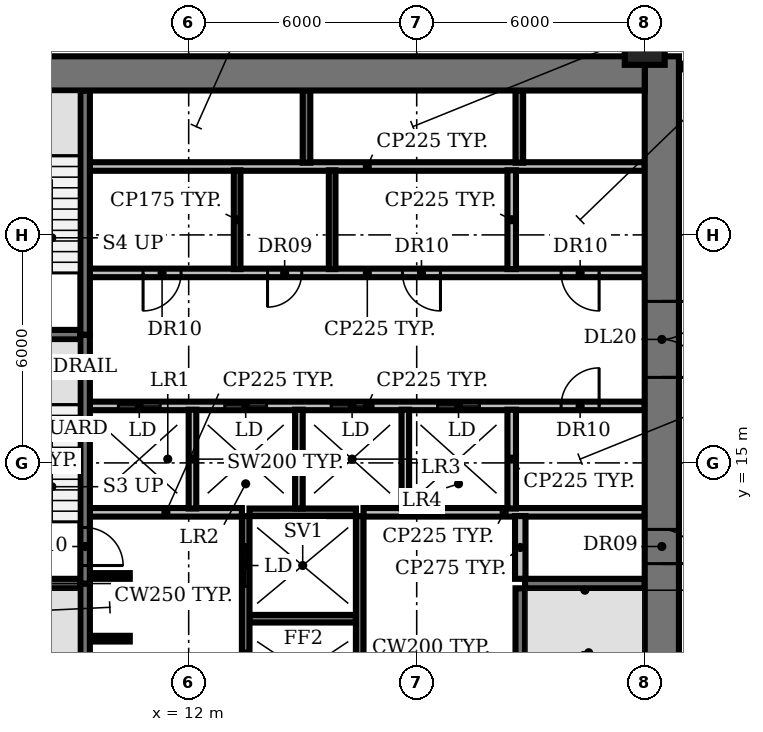
"""IFC4 building model, lengths in metres.
Left out: names, types, materials, properties, quantities, classifications, styles, units other than length and angle.
Written with IfcOpenShell. Run it as: python <this file> out.ifc"""

import sys

from ifc_helpers import new_model, si_unit, direction, frame, frame_2d, origin, origin_2d, place, context, subcontext, project, spatial, rectangle, circle, extrude, element, fill, save


model = new_model("IFC4")
c1 = context("Model", 3, precision=1e-05, world=origin(), true_north=direction((0.0, 1.0)))
c2 = subcontext(c1, "Body", "Model", "MODEL_VIEW")
j1 = project(units=[si_unit("LENGTHUNIT", "METRE"), si_unit("PLANEANGLEUNIT", "RADIAN")], contexts=[c1])
p1 = place(None, origin())
s1 = spatial("IfcSite", under=j1, at=p1, CompositionType="ELEMENT")
p2 = place(p1, origin())
s2 = spatial("IfcBuilding", under=s1, at=p2, CompositionType="ELEMENT")
p3 = place(p2, frame((0.0, 0.0, 45.8)))
s3 = spatial("IfcBuildingStorey", under=s2, at=p3, CompositionType="ELEMENT", Elevation=45.8)
p4 = place(p3, frame((24.0, 26.0, 0.0), z_axis=(0.0, 0.0, 1.0), x_axis=(1.0, 0.0, 0.0)))
e1 = element("IfcColumn", 1, at=p4, inside=s3, PredefinedType="COLUMN", context=c2, shape_type="SweptSolid", body=[
    extrude(circle(Radius=0.525, at=origin_2d()), origin(), (0.0, 0.0, 1.0), 3.85),
])
p5 = place(p3, frame((9.4, 10.375, 0.0), z_axis=(0.0, 0.0, 1.0), x_axis=(1.0, 0.0, 0.0)))
e2 = element("IfcWall", 2, at=p5, inside=s3, PredefinedType="SHEAR", context=c2, shape_type="SweptSolid", body=[
    extrude(rectangle(XDim=1.05, YDim=0.15, at=frame_2d((0.525, 0.0))), origin(), (0.0, 0.0, 1.0), 3.85),
])
p6 = place(p3, frame((13.6, 10.9, 0.0), z_axis=(0.0, 0.0, 1.0), x_axis=(1.0, 0.0, 0.0)))
e3 = element("IfcWall", 3, at=p6, inside=s3, PredefinedType="SHEAR", context=c2, shape_type="SweptSolid", body=[
    extrude(rectangle(XDim=2.8, YDim=0.2, at=frame_2d((1.4, 0.0))), origin(), (0.0, 0.0, 1.0), 3.85),
])
for number, where, z_axis, x_axis in (
    (4, (6.0, 11.825, 0.0), (0.0, 0.0, 1.0), (1.0, 0.0, 0.0)),
    (5, (20.85, 11.825, 0.0), (0.0, 0.0, 1.0), (1.0, 0.0, 0.0)),
):
    element("IfcWall", number, at=place(p3, frame(where, z_axis=z_axis, x_axis=x_axis)), inside=s3, PredefinedType="SHEAR", context=c2, shape_type="SweptSolid", body=[
        extrude(rectangle(XDim=3.15, YDim=0.25, at=frame_2d((1.575, 0.0))), origin(), (0.0, 0.0, 1.0), 3.85),
    ])
p7 = place(p3, frame((9.4, 12.025, 0.0), z_axis=(0.0, 0.0, 1.0), x_axis=(1.0, 0.0, 0.0)))
e6 = element("IfcWall", 6, at=p7, inside=s3, PredefinedType="SHEAR", context=c2, shape_type="SweptSolid", body=[
    extrude(rectangle(XDim=1.05, YDim=0.15, at=frame_2d((0.525, 0.0))), origin(), (0.0, 0.0, 1.0), 3.85),
])
p8 = place(p3, frame((9.4, 13.7, 0.0), z_axis=(0.0, 0.0, 1.0), x_axis=(1.0, 0.0, 0.0)))
e7 = element("IfcWall", 7, at=p8, inside=s3, PredefinedType="PARTITIONING", context=c2, shape_type="SweptSolid", body=[
    extrude(rectangle(XDim=4.0, YDim=0.225, at=frame_2d((2.0, 0.0))), origin(), (0.0, 0.0, 1.0), 3.85),
])
p9 = place(p3, frame((13.6, 13.7, 0.0), z_axis=(0.0, 0.0, 1.0), x_axis=(1.0, 0.0, 0.0)))
e8 = element("IfcWall", 8, at=p9, inside=s3, PredefinedType="SHEAR", context=c2, shape_type="SweptSolid", body=[
    extrude(rectangle(XDim=2.8, YDim=0.2, at=frame_2d((1.4, 0.0))), origin(), (0.0, 0.0, 1.0), 3.85),
])
p10 = place(p3, frame((16.6, 13.7, 0.0), z_axis=(0.0, 0.0, 1.0), x_axis=(1.0, 0.0, 0.0)))
e9 = element("IfcWall", 9, at=p10, inside=s3, PredefinedType="PARTITIONING", context=c2, shape_type="SweptSolid", body=[
    extrude(rectangle(XDim=7.4, YDim=0.225, at=frame_2d((3.7, 0.0))), origin(), (0.0, 0.0, 1.0), 3.85),
])
p11 = place(p3, frame((9.4, 16.5, 0.0), z_axis=(0.0, 0.0, 1.0), x_axis=(1.0, 0.0, 0.0)))
e10 = element("IfcWall", 10, at=p11, inside=s3, PredefinedType="PARTITIONING", context=c2, shape_type="SweptSolid", body=[
    extrude(rectangle(XDim=14.6, YDim=0.225, at=frame_2d((7.3, 0.0))), origin(), (0.0, 0.0, 1.0), 3.85),
])
p12 = place(p11, frame((0.75, 0.0, 0.0)))
e11 = element("IfcOpeningElement", 11, at=p12, cuts=e10, PredefinedType="OPENING", context=c2, shape_type="SweptSolid", body=[
    extrude(rectangle(XDim=1.1, YDim=2.1, at=frame_2d((0.55, 1.05))), frame((0.0, 0.123, 0.0), z_axis=(0.0, -1.0, 0.0), x_axis=(1.0, 0.0, 0.0)), (0.0, 0.0, 1.0), 0.245),
])
p13 = place(p11, frame((3.55, 0.0, 0.0)))
e12 = element("IfcOpeningElement", 12, at=p13, cuts=e10, PredefinedType="OPENING", context=c2, shape_type="SweptSolid", body=[
    extrude(rectangle(XDim=1.1, YDim=2.1, at=frame_2d((0.55, 1.05))), frame((0.0, 0.123, 0.0), z_axis=(0.0, -1.0, 0.0), x_axis=(1.0, 0.0, 0.0)), (0.0, 0.0, 1.0), 0.245),
])
p14 = place(p11, frame((6.35, 0.0, 0.0)))
e13 = element("IfcOpeningElement", 13, at=p14, cuts=e10, PredefinedType="OPENING", context=c2, shape_type="SweptSolid", body=[
    extrude(rectangle(XDim=1.1, YDim=2.1, at=frame_2d((0.55, 1.05))), frame((0.0, 0.123, 0.0), z_axis=(0.0, -1.0, 0.0), x_axis=(1.0, 0.0, 0.0)), (0.0, 0.0, 1.0), 0.245),
])
p15 = place(p11, frame((9.15, 0.0, 0.0)))
e14 = element("IfcOpeningElement", 14, at=p15, cuts=e10, PredefinedType="OPENING", context=c2, shape_type="SweptSolid", body=[
    extrude(rectangle(XDim=1.1, YDim=2.1, at=frame_2d((0.55, 1.05))), frame((0.0, 0.123, 0.0), z_axis=(0.0, -1.0, 0.0), x_axis=(1.0, 0.0, 0.0)), (0.0, 0.0, 1.0), 0.245),
])
p16 = place(p11, frame((12.4, 0.0, 0.0)))
e15 = element("IfcOpeningElement", 15, at=p16, cuts=e10, PredefinedType="OPENING", context=c2, shape_type="SweptSolid", body=[
    extrude(rectangle(XDim=1.0, YDim=2.1, at=frame_2d((0.5, 1.05))), frame((0.0, 0.123, 0.0), z_axis=(0.0, -1.0, 0.0), x_axis=(1.0, 0.0, 0.0)), (0.0, 0.0, 1.0), 0.245),
])
p17 = place(p3, frame((6.0, 18.375, 0.0), z_axis=(0.0, 0.0, 1.0), x_axis=(1.0, 0.0, 0.0)))
e16 = element("IfcWall", 16, at=p17, inside=s3, PredefinedType="SHEAR", context=c2, shape_type="SweptSolid", body=[
    extrude(rectangle(XDim=3.15, YDim=0.25, at=frame_2d((1.575, 0.0))), origin(), (0.0, 0.0, 1.0), 3.85),
])
p18 = place(p3, frame((24.0, 20.0, 0.0), z_axis=(0.0, 0.0, 1.0), x_axis=(-1.0, 0.0, 0.0)))
e17 = element("IfcWall", 17, at=p18, inside=s3, PredefinedType="PARTITIONING", context=c2, shape_type="SweptSolid", body=[
    extrude(rectangle(XDim=14.6, YDim=0.225, at=frame_2d((7.3, 0.0))), origin(), (0.0, 0.0, 1.0), 3.85),
])
p19 = place(p18, frame((12.2, 0.0, 0.0)))
e18 = element("IfcOpeningElement", 18, at=p19, cuts=e17, PredefinedType="OPENING", context=c2, shape_type="SweptSolid", body=[
    extrude(rectangle(XDim=1.0, YDim=2.1, at=frame_2d((0.5, 1.05))), frame((0.0, 0.123, 0.0), z_axis=(0.0, -1.0, 0.0), x_axis=(1.0, 0.0, 0.0)), (0.0, 0.0, 1.0), 0.245),
])
p20 = place(p18, frame((9.025, 0.0, 0.0)))
e19 = element("IfcOpeningElement", 19, at=p20, cuts=e17, PredefinedType="OPENING", context=c2, shape_type="SweptSolid", body=[
    extrude(rectangle(XDim=0.9, YDim=2.1, at=frame_2d((0.45, 1.05))), frame((0.0, 0.123, 0.0), z_axis=(0.0, -1.0, 0.0), x_axis=(1.0, 0.0, 0.0)), (0.0, 0.0, 1.0), 0.245),
])
p21 = place(p18, frame((5.375, 0.0, 0.0)))
e20 = element("IfcOpeningElement", 20, at=p21, cuts=e17, PredefinedType="OPENING", context=c2, shape_type="SweptSolid", body=[
    extrude(rectangle(XDim=1.0, YDim=2.1, at=frame_2d((0.5, 1.05))), frame((0.0, 0.123, 0.0), z_axis=(0.0, -1.0, 0.0), x_axis=(1.0, 0.0, 0.0)), (0.0, 0.0, 1.0), 0.245),
])
p22 = place(p18, frame((1.2, 0.0, 0.0)))
e21 = element("IfcOpeningElement", 21, at=p22, cuts=e17, PredefinedType="OPENING", context=c2, shape_type="SweptSolid", body=[
    extrude(rectangle(XDim=1.0, YDim=2.1, at=frame_2d((0.5, 1.05))), frame((0.0, 0.123, 0.0), z_axis=(0.0, -1.0, 0.0), x_axis=(1.0, 0.0, 0.0)), (0.0, 0.0, 1.0), 0.245),
])
p23 = place(p3, frame((9.4, 22.8, 0.0), z_axis=(0.0, 0.0, 1.0), x_axis=(1.0, 0.0, 0.0)))
e22 = element("IfcWall", 22, at=p23, inside=s3, PredefinedType="PARTITIONING", context=c2, shape_type="SweptSolid", body=[
    extrude(rectangle(XDim=14.6, YDim=0.225, at=frame_2d((7.3, 0.0))), origin(), (0.0, 0.0, 1.0), 3.85),
])
p24 = place(p3, frame((9.275, 11.825, 0.0), z_axis=(0.0, 0.0, 1.0), x_axis=(0.0, -1.0, 0.0)))
e23 = element("IfcWall", 23, at=p24, inside=s3, PredefinedType="SHEAR", context=c2, shape_type="SweptSolid", body=[
    extrude(rectangle(XDim=6.425, YDim=0.25, at=frame_2d((3.212, 0.0))), origin(), (0.0, 0.0, 1.0), 3.85),
])
p25 = place(p24, frame((5.075, 0.0, 0.0)))
e24 = element("IfcOpeningElement", 24, at=p25, cuts=e23, PredefinedType="OPENING", context=c2, shape_type="SweptSolid", body=[
    extrude(rectangle(XDim=1.0, YDim=2.1, at=frame_2d((0.5, 1.05))), frame((0.0, 0.135, 0.0), z_axis=(0.0, -1.0, 0.0), x_axis=(1.0, 0.0, 0.0)), (0.0, 0.0, 1.0), 0.27),
])
p26 = place(p3, frame((9.275, 18.375, 0.0), z_axis=(0.0, 0.0, 1.0), x_axis=(0.0, -1.0, 0.0)))
e25 = element("IfcWall", 25, at=p26, inside=s3, PredefinedType="SHEAR", context=c2, shape_type="SweptSolid", body=[
    extrude(rectangle(XDim=6.55, YDim=0.25, at=frame_2d((3.275, 0.0))), origin(), (0.0, 0.0, 1.0), 3.85),
])
p27 = place(p26, frame((5.075, 0.0, 0.0)))
e26 = element("IfcOpeningElement", 26, at=p27, cuts=e25, PredefinedType="OPENING", context=c2, shape_type="SweptSolid", body=[
    extrude(rectangle(XDim=1.0, YDim=2.1, at=frame_2d((0.5, 1.05))), frame((0.0, 0.135, 0.0), z_axis=(0.0, -1.0, 0.0), x_axis=(1.0, 0.0, 0.0)), (0.0, 0.0, 1.0), 0.27),
])
p28 = place(p3, frame((9.275, 18.375, 0.0), z_axis=(0.0, 0.0, 1.0), x_axis=(0.0, 1.0, 0.0)))
e27 = element("IfcWall", 27, at=p28, inside=s3, PredefinedType="SHEAR", context=c2, shape_type="SweptSolid", body=[
    extrude(rectangle(XDim=6.425, YDim=0.25, at=frame_2d((3.212, 0.0))), origin(), (0.0, 0.0, 1.0), 3.85),
])
p29 = place(p3, frame((12.1, 13.8, 0.0), z_axis=(0.0, 0.0, 1.0), x_axis=(0.0, 1.0, 0.0)))
e28 = element("IfcWall", 28, at=p29, inside=s3, PredefinedType="SOLIDWALL", context=c2, shape_type="SweptSolid", body=[
    extrude(rectangle(XDim=2.6, YDim=0.2, at=frame_2d((1.3, 0.0))), origin(), (0.0, 0.0, 1.0), 3.85),
])
p30 = place(p3, frame((13.275, 20.1, 0.0), z_axis=(0.0, 0.0, 1.0), x_axis=(0.0, 1.0, 0.0)))
e29 = element("IfcWall", 29, at=p30, inside=s3, PredefinedType="PARTITIONING", context=c2, shape_type="SweptSolid", body=[
    extrude(rectangle(XDim=2.6, YDim=0.175, at=frame_2d((1.3, 0.0))), origin(), (0.0, 0.0, 1.0), 3.85),
])
p31 = place(p3, frame((13.5, 5.4, 0.0), z_axis=(0.0, 0.0, 1.0), x_axis=(0.0, 1.0, 0.0)))
e30 = element("IfcWall", 30, at=p31, inside=s3, PredefinedType="SHEAR", context=c2, shape_type="SweptSolid", body=[
    extrude(rectangle(XDim=8.2, YDim=0.2, at=frame_2d((4.1, 0.0))), origin(), (0.0, 0.0, 1.0), 3.85),
])
p32 = place(p31, frame((0.75, 0.0, 0.0)))
e31 = element("IfcOpeningElement", 31, at=p32, cuts=e30, PredefinedType="OPENING", context=c2, shape_type="SweptSolid", body=[
    extrude(rectangle(XDim=1.1, YDim=2.1, at=frame_2d((0.55, 1.05))), frame((0.0, 0.11, 0.0), z_axis=(0.0, -1.0, 0.0), x_axis=(1.0, 0.0, 0.0)), (0.0, 0.0, 1.0), 0.22),
])
p33 = place(p31, frame((3.55, 0.0, 0.0)))
e32 = element("IfcOpeningElement", 32, at=p33, cuts=e30, PredefinedType="OPENING", context=c2, shape_type="SweptSolid", body=[
    extrude(rectangle(XDim=1.1, YDim=2.1, at=frame_2d((0.55, 1.05))), frame((0.0, 0.11, 0.0), z_axis=(0.0, -1.0, 0.0), x_axis=(1.0, 0.0, 0.0)), (0.0, 0.0, 1.0), 0.22),
])
p34 = place(p31, frame((6.35, 0.0, 0.0)))
e33 = element("IfcOpeningElement", 33, at=p34, cuts=e30, PredefinedType="OPENING", context=c2, shape_type="SweptSolid", body=[
    extrude(rectangle(XDim=1.1, YDim=2.1, at=frame_2d((0.55, 1.05))), frame((0.0, 0.11, 0.0), z_axis=(0.0, -1.0, 0.0), x_axis=(1.0, 0.0, 0.0)), (0.0, 0.0, 1.0), 0.22),
])
p35 = place(p3, frame((14.9, 13.8, 0.0), z_axis=(0.0, 0.0, 1.0), x_axis=(0.0, 1.0, 0.0)))
e34 = element("IfcWall", 34, at=p35, inside=s3, PredefinedType="SOLIDWALL", context=c2, shape_type="SweptSolid", body=[
    extrude(rectangle(XDim=2.6, YDim=0.2, at=frame_2d((1.3, 0.0))), origin(), (0.0, 0.0, 1.0), 3.85),
])
p36 = place(p3, frame((15.1, 22.9, 0.0), z_axis=(0.0, 0.0, 1.0), x_axis=(0.0, 1.0, 0.0)))
e35 = element("IfcWall", 35, at=p36, inside=s3, PredefinedType="SHEAR", context=c2, shape_type="SweptSolid", body=[
    extrude(rectangle(XDim=1.9, YDim=0.2, at=frame_2d((0.95, 0.0))), origin(), (0.0, 0.0, 1.0), 3.85),
])
p37 = place(p3, frame((15.775, 20.1, 0.0), z_axis=(0.0, 0.0, 1.0), x_axis=(0.0, 1.0, 0.0)))
e36 = element("IfcWall", 36, at=p37, inside=s3, PredefinedType="PARTITIONING", context=c2, shape_type="SweptSolid", body=[
    extrude(rectangle(XDim=2.6, YDim=0.175, at=frame_2d((1.3, 0.0))), origin(), (0.0, 0.0, 1.0), 3.85),
])
p38 = place(p3, frame((16.5, 5.4, 0.0), z_axis=(0.0, 0.0, 1.0), x_axis=(0.0, 1.0, 0.0)))
e37 = element("IfcWall", 37, at=p38, inside=s3, PredefinedType="SHEAR", context=c2, shape_type="SweptSolid", body=[
    extrude(rectangle(XDim=8.2, YDim=0.2, at=frame_2d((4.1, 0.0))), origin(), (0.0, 0.0, 1.0), 3.85),
])
p39 = place(p3, frame((17.7, 13.8, 0.0), z_axis=(0.0, 0.0, 1.0), x_axis=(0.0, 1.0, 0.0)))
e38 = element("IfcWall", 38, at=p39, inside=s3, PredefinedType="SOLIDWALL", context=c2, shape_type="SweptSolid", body=[
    extrude(rectangle(XDim=2.6, YDim=0.2, at=frame_2d((1.3, 0.0))), origin(), (0.0, 0.0, 1.0), 3.85),
])
for number, where, z_axis, x_axis in (
    (39, (20.5, 13.8, 0.0), (0.0, 0.0, 1.0), (0.0, 1.0, 0.0)),
    (40, (20.5, 20.1, 0.0), (0.0, 0.0, 1.0), (0.0, 1.0, 0.0)),
):
    element("IfcWall", number, at=place(p3, frame(where, z_axis=z_axis, x_axis=x_axis)), inside=s3, PredefinedType="PARTITIONING", context=c2, shape_type="SweptSolid", body=[
        extrude(rectangle(XDim=2.6, YDim=0.225, at=frame_2d((1.3, 0.0))), origin(), (0.0, 0.0, 1.0), 3.85),
    ])
p40 = place(p3, frame((20.7, 22.9, 0.0), z_axis=(0.0, 0.0, 1.0), x_axis=(0.0, 1.0, 0.0)))
e41 = element("IfcWall", 41, at=p40, inside=s3, PredefinedType="SHEAR", context=c2, shape_type="SweptSolid", body=[
    extrude(rectangle(XDim=1.9, YDim=0.2, at=frame_2d((0.95, 0.0))), origin(), (0.0, 0.0, 1.0), 3.85),
])
p41 = place(p3, frame((20.725, 5.4, 0.0), z_axis=(0.0, 0.0, 1.0), x_axis=(0.0, 1.0, 0.0)))
e42 = element("IfcWall", 42, at=p41, inside=s3, PredefinedType="SHEAR", context=c2, shape_type="SweptSolid", body=[
    extrude(rectangle(XDim=6.3, YDim=0.25, at=frame_2d((3.15, 0.0))), origin(), (0.0, 0.0, 1.0), 3.85),
])
p42 = place(p3, frame((20.725, 11.95, 0.0), z_axis=(0.0, 0.0, 1.0), x_axis=(0.0, 1.0, 0.0)))
e43 = element("IfcWall", 43, at=p42, inside=s3, PredefinedType="PARTITIONING", context=c2, shape_type="SweptSolid", body=[
    extrude(rectangle(XDim=1.65, YDim=0.275, at=frame_2d((0.825, 0.0))), origin(), (0.0, 0.0, 1.0), 3.85),
])
p43 = place(p3, frame((24.45, 25.7, 0.0), z_axis=(0.0, 0.0, 1.0), x_axis=(0.0, -1.0, 0.0)))
e44 = element("IfcWall", 44, at=p43, inside=s3, PredefinedType="SHEAR", context=c2, shape_type="SweptSolid", body=[
    extrude(rectangle(XDim=21.2, YDim=0.9, at=frame_2d((10.6, 0.0))), origin(), (0.0, 0.0, 1.0), 3.85),
])
p44 = place(p43, frame((18.55, 0.0, 0.0)))
e45 = element("IfcOpeningElement", 45, at=p44, cuts=e44, PredefinedType="OPENING", context=c2, shape_type="SweptSolid", body=[
    extrude(rectangle(XDim=1.5, YDim=2.1, at=frame_2d((0.75, 1.05))), frame((0.0, 0.46, 0.0), z_axis=(0.0, -1.0, 0.0), x_axis=(1.0, 0.0, 0.0)), (0.0, 0.0, 1.0), 0.92),
])
p45 = place(p43, frame((12.45, 0.0, 0.0)))
e46 = element("IfcOpeningElement", 46, at=p45, cuts=e44, PredefinedType="OPENING", context=c2, shape_type="SweptSolid", body=[
    extrude(rectangle(XDim=0.9, YDim=2.1, at=frame_2d((0.45, 1.05))), frame((0.0, 0.46, 0.0), z_axis=(0.0, -1.0, 0.0), x_axis=(1.0, 0.0, 0.0)), (0.0, 0.0, 1.0), 0.92),
])
p46 = place(p43, frame((6.45, 0.0, 0.0)))
e47 = element("IfcOpeningElement", 47, at=p46, cuts=e44, PredefinedType="OPENING", context=c2, shape_type="SweptSolid", body=[
    extrude(rectangle(XDim=2.0, YDim=2.1, at=frame_2d((1.0, 1.05))), frame((0.0, 0.46, 0.0), z_axis=(0.0, -1.0, 0.0), x_axis=(1.0, 0.0, 0.0)), (0.0, 0.0, 1.0), 0.92),
])
p47 = place(p3, frame((6.0, 25.25, 0.0), z_axis=(0.0, 0.0, 1.0), x_axis=(1.0, 0.0, 0.0)))
e48 = element("IfcWall", 48, at=p47, inside=s3, PredefinedType="SHEAR", context=c2, shape_type="SweptSolid", body=[
    extrude(rectangle(XDim=18.0, YDim=0.9, at=frame_2d((9.0, 0.0))), origin(), (0.0, 0.0, 1.0), 3.85),
])
p48 = place(p12, origin())
e49 = element("IfcDoor", 49, at=p48, inside=s3, OperationType="DOUBLE_DOOR_SLIDING", PredefinedType="DOOR", context=c2, shape_type="SweptSolid", body=[
    extrude(rectangle(XDim=1.1, YDim=2.1, at=frame_2d((0.55, 1.05))), frame((0.0, 0.025, 0.0), z_axis=(0.0, -1.0, 0.0), x_axis=(1.0, 0.0, 0.0)), (0.0, 0.0, 1.0), 0.05),
])
fill(e11, e49)
p49 = place(p13, origin())
e50 = element("IfcDoor", 50, at=p49, inside=s3, OperationType="DOUBLE_DOOR_SLIDING", PredefinedType="DOOR", context=c2, shape_type="SweptSolid", body=[
    extrude(rectangle(XDim=1.1, YDim=2.1, at=frame_2d((0.55, 1.05))), frame((0.0, 0.025, 0.0), z_axis=(0.0, -1.0, 0.0), x_axis=(1.0, 0.0, 0.0)), (0.0, 0.0, 1.0), 0.05),
])
fill(e12, e50)
p50 = place(p14, origin())
e51 = element("IfcDoor", 51, at=p50, inside=s3, OperationType="DOUBLE_DOOR_SLIDING", PredefinedType="DOOR", context=c2, shape_type="SweptSolid", body=[
    extrude(rectangle(XDim=1.1, YDim=2.1, at=frame_2d((0.55, 1.05))), frame((0.0, 0.025, 0.0), z_axis=(0.0, -1.0, 0.0), x_axis=(1.0, 0.0, 0.0)), (0.0, 0.0, 1.0), 0.05),
])
fill(e13, e51)
p51 = place(p15, origin())
e52 = element("IfcDoor", 52, at=p51, inside=s3, OperationType="DOUBLE_DOOR_SLIDING", PredefinedType="DOOR", context=c2, shape_type="SweptSolid", body=[
    extrude(rectangle(XDim=1.1, YDim=2.1, at=frame_2d((0.55, 1.05))), frame((0.0, 0.025, 0.0), z_axis=(0.0, -1.0, 0.0), x_axis=(1.0, 0.0, 0.0)), (0.0, 0.0, 1.0), 0.05),
])
fill(e14, e52)
p52 = place(p16, origin())
e53 = element("IfcDoor", 53, at=p52, inside=s3, OperationType="SINGLE_SWING_RIGHT", PredefinedType="DOOR", context=c2, shape_type="SweptSolid", body=[
    extrude(rectangle(XDim=1.0, YDim=2.1, at=frame_2d((0.5, 1.05))), frame((0.0, 0.025, 0.0), z_axis=(0.0, -1.0, 0.0), x_axis=(1.0, 0.0, 0.0)), (0.0, 0.0, 1.0), 0.05),
])
fill(e15, e53)
p53 = place(p19, origin())
e54 = element("IfcDoor", 54, at=p53, inside=s3, OperationType="SINGLE_SWING_RIGHT", PredefinedType="DOOR", context=c2, shape_type="SweptSolid", body=[
    extrude(rectangle(XDim=1.0, YDim=2.1, at=frame_2d((0.5, 1.05))), frame((0.0, 0.025, 0.0), z_axis=(0.0, -1.0, 0.0), x_axis=(1.0, 0.0, 0.0)), (0.0, 0.0, 1.0), 0.05),
])
fill(e18, e54)
p54 = place(p20, origin())
e55 = element("IfcDoor", 55, at=p54, inside=s3, OperationType="SINGLE_SWING_RIGHT", PredefinedType="DOOR", context=c2, shape_type="SweptSolid", body=[
    extrude(rectangle(XDim=0.9, YDim=2.1, at=frame_2d((0.45, 1.05))), frame((0.0, 0.025, 0.0), z_axis=(0.0, -1.0, 0.0), x_axis=(1.0, 0.0, 0.0)), (0.0, 0.0, 1.0), 0.05),
])
fill(e19, e55)
p55 = place(p21, origin())
e56 = element("IfcDoor", 56, at=p55, inside=s3, OperationType="SINGLE_SWING_LEFT", PredefinedType="DOOR", context=c2, shape_type="SweptSolid", body=[
    extrude(rectangle(XDim=1.0, YDim=2.1, at=frame_2d((0.5, 1.05))), frame((0.0, 0.025, 0.0), z_axis=(0.0, -1.0, 0.0), x_axis=(1.0, 0.0, 0.0)), (0.0, 0.0, 1.0), 0.05),
])
fill(e20, e56)
p56 = place(p22, origin())
e57 = element("IfcDoor", 57, at=p56, inside=s3, OperationType="SINGLE_SWING_LEFT", PredefinedType="DOOR", context=c2, shape_type="SweptSolid", body=[
    extrude(rectangle(XDim=1.0, YDim=2.1, at=frame_2d((0.5, 1.05))), frame((0.0, 0.025, 0.0), z_axis=(0.0, -1.0, 0.0), x_axis=(1.0, 0.0, 0.0)), (0.0, 0.0, 1.0), 0.05),
])
fill(e21, e57)
p57 = place(p27, origin())
e58 = element("IfcDoor", 58, at=p57, inside=s3, OperationType="SINGLE_SWING_RIGHT", PredefinedType="DOOR", context=c2, shape_type="SweptSolid", body=[
    extrude(rectangle(XDim=1.0, YDim=2.1, at=frame_2d((0.5, 1.05))), frame((0.0, 0.025, 0.0), z_axis=(0.0, -1.0, 0.0), x_axis=(1.0, 0.0, 0.0)), (0.0, 0.0, 1.0), 0.05),
])
fill(e26, e58)
p58 = place(p33, origin())
e59 = element("IfcDoor", 59, at=p58, inside=s3, OperationType="DOUBLE_DOOR_SLIDING", PredefinedType="DOOR", context=c2, shape_type="SweptSolid", body=[
    extrude(rectangle(XDim=1.1, YDim=2.1, at=frame_2d((0.55, 1.05))), frame((0.0, 0.025, 0.0), z_axis=(0.0, -1.0, 0.0), x_axis=(1.0, 0.0, 0.0)), (0.0, 0.0, 1.0), 0.05),
])
fill(e32, e59)
p59 = place(p34, origin())
e60 = element("IfcDoor", 60, at=p59, inside=s3, OperationType="DOUBLE_DOOR_SLIDING", PredefinedType="DOOR", context=c2, shape_type="SweptSolid", body=[
    extrude(rectangle(XDim=1.1, YDim=2.1, at=frame_2d((0.55, 1.05))), frame((0.0, 0.025, 0.0), z_axis=(0.0, -1.0, 0.0), x_axis=(1.0, 0.0, 0.0)), (0.0, 0.0, 1.0), 0.05),
])
fill(e33, e60)
p60 = place(p45, origin())
e61 = element("IfcDoor", 61, at=p60, inside=s3, OperationType="SINGLE_SWING_RIGHT", PredefinedType="DOOR", context=c2, shape_type="SweptSolid", body=[
    extrude(rectangle(XDim=0.9, YDim=2.1, at=frame_2d((0.45, 1.05))), frame((0.0, -0.39, 0.0), z_axis=(0.0, -1.0, 0.0), x_axis=(1.0, 0.0, 0.0)), (0.0, 0.0, 1.0), 0.05),
])
fill(e46, e61)
p61 = place(p46, origin())
e62 = element("IfcDoor", 62, at=p61, inside=s3, OperationType="DOUBLE_DOOR_SINGLE_SWING", PredefinedType="DOOR", context=c2, shape_type="SweptSolid", body=[
    extrude(rectangle(XDim=2.0, YDim=2.1, at=frame_2d((1.0, 1.05))), frame((0.0, 0.025, 0.0), z_axis=(0.0, -1.0, 0.0), x_axis=(1.0, 0.0, 0.0)), (0.0, 0.0, 1.0), 0.05),
])
fill(e47, e62)
save(model, sys.argv[1])
